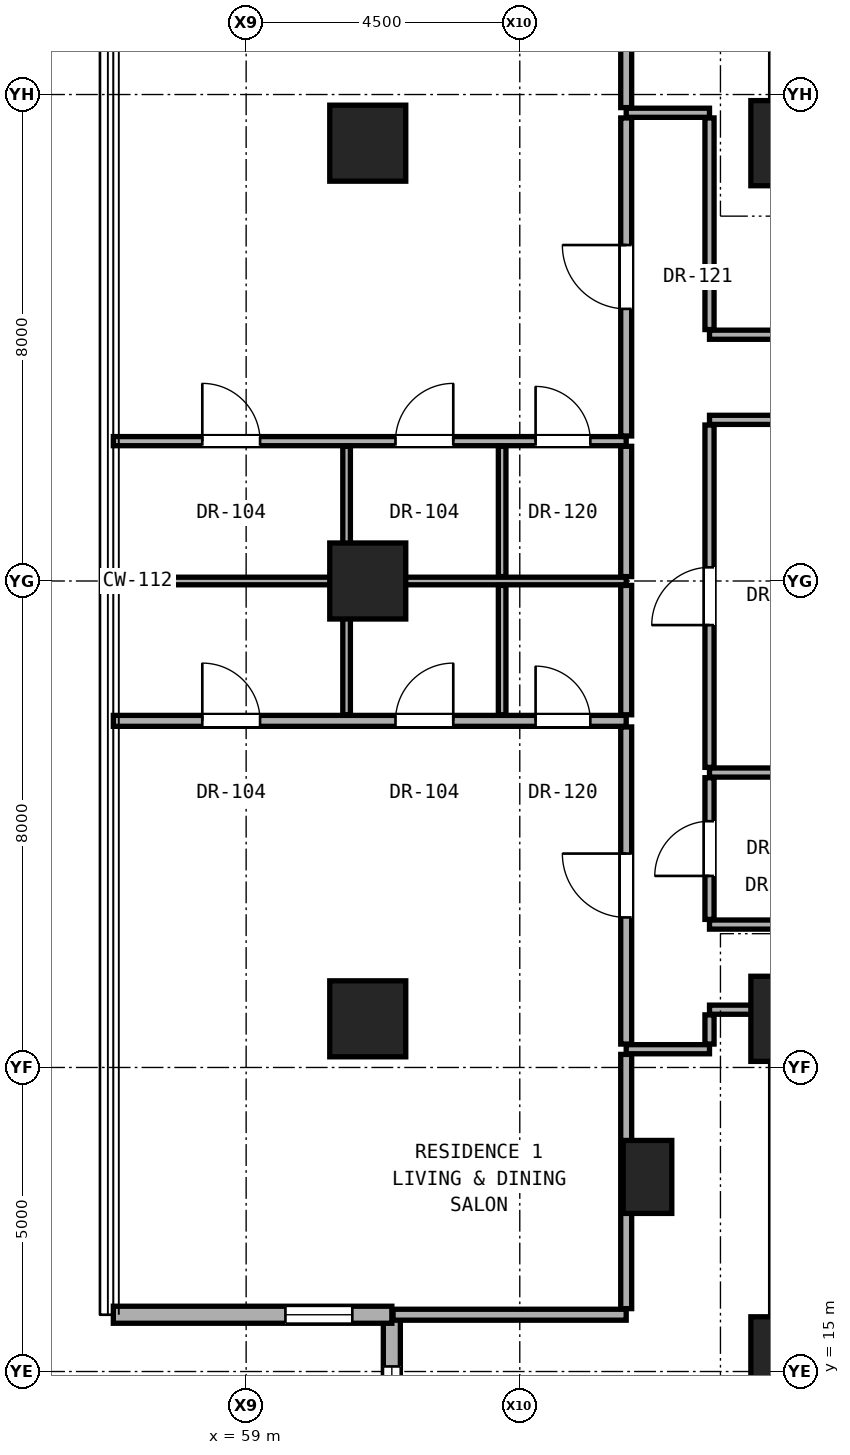
"""IFC4 building model, lengths in metres.
Left out: names, types, materials, properties, quantities, classifications, styles, units other than length and angle.
Written with IfcOpenShell. Run it as: python <this file> out.ifc"""

import sys

from ifc_helpers import new_model, si_unit, direction, frame, frame_2d, origin, origin_2d, place, context, subcontext, project, spatial, rectangle, hollow_rectangle, extrude, element, fill, save


model = new_model("IFC4")
c1 = context("Model", 3, precision=1e-05, world=origin(), true_north=direction((0.0, 1.0)))
c2 = subcontext(c1, "Body", "Model", "MODEL_VIEW")
j1 = project(units=[si_unit("LENGTHUNIT", "METRE"), si_unit("PLANEANGLEUNIT", "RADIAN")], contexts=[c1])
p1 = place(None, origin())
s1 = spatial("IfcSite", under=j1, at=p1, CompositionType="ELEMENT")
p2 = place(p1, origin())
s2 = spatial("IfcBuilding", under=s1, at=p2, CompositionType="ELEMENT")
p3 = place(p2, frame((0.0, 0.0, 48.8)))
s3 = spatial("IfcBuildingStorey", under=s2, at=p3, CompositionType="ELEMENT", Elevation=48.8)
for number, where, z_axis, x_axis in (
    (1, (68.0, 15.2, 0.0), (0.0, 0.0, 1.0), (1.0, 0.0, 0.0)),
    (2, (68.0, 20.8, 0.0), (0.0, 0.0, 1.0), (1.0, 0.0, 0.0)),
    (3, (68.0, 35.2, 0.0), (0.0, 0.0, 1.0), (1.0, 0.0, 0.0)),
):
    element("IfcColumn", number, at=place(p3, frame(where, z_axis=z_axis, x_axis=x_axis)), inside=s3, PredefinedType="COLUMN", context=c2, shape_type="SweptSolid", body=[
        extrude(rectangle(XDim=1.4, YDim=1.4, at=origin_2d()), origin(), (0.0, 0.0, 1.0), 3.3),
    ])
for number, where, z_axis, x_axis in (
    (4, (61.0, 20.8, 0.0), (0.0, 0.0, 1.0), (1.0, 0.0, 0.0)),
    (5, (61.0, 28.0, 0.0), (0.0, 0.0, 1.0), (1.0, 0.0, 0.0)),
    (6, (61.0, 35.2, 0.0), (0.0, 0.0, 1.0), (1.0, 0.0, 0.0)),
):
    element("IfcColumn", number, at=place(p3, frame(where, z_axis=z_axis, x_axis=x_axis)), inside=s3, PredefinedType="COLUMN", context=c2, shape_type="SweptSolid", body=[
        extrude(hollow_rectangle(XDim=1.25, YDim=1.25, WallThickness=0.07, at=origin_2d()), origin(), (0.0, 0.0, 1.0), 3.3),
    ])
p4 = place(p3, frame((65.6, 18.2, 0.0), z_axis=(0.0, 0.0, 1.0), x_axis=(1.0, 0.0, 0.0)))
e7 = element("IfcColumn", 7, at=p4, inside=s3, PredefinedType="PILASTER", context=c2, shape_type="SweptSolid", body=[
    extrude(rectangle(XDim=0.8, YDim=1.2, at=origin_2d()), origin(), (0.0, 0.0, 1.0), 3.3),
])
p5 = place(p3, frame((61.396, 15.934, 0.0), z_axis=(0.0, 0.0, 1.0), x_axis=(0.0, -1.0, 0.0)))
e8 = element("IfcWall", 8, at=p5, inside=s3, PredefinedType="SOLIDWALL", context=c2, shape_type="SweptSolid", body=[
    extrude(rectangle(XDim=4.58, YDim=0.28, at=frame_2d((2.29, 0.0))), origin(), (0.0, 0.0, 1.0), 3.04),
])
p6 = place(p5, frame((0.85, 0.0, 0.79)))
e9 = element("IfcOpeningElement", 9, at=p6, cuts=e8, PredefinedType="OPENING", context=c2, shape_type="SweptSolid", body=[
    extrude(rectangle(XDim=1.5, YDim=2.1, at=frame_2d((0.75, 1.05))), frame((0.0, 0.15, 0.0), z_axis=(0.0, -1.0, 0.0), x_axis=(1.0, 0.0, 0.0)), (0.0, 0.0, 1.0), 0.3),
])
p7 = place(p3, frame((56.816, 15.934, 0.0), z_axis=(0.0, 0.0, 1.0), x_axis=(1.0, 0.0, 0.0)))
e10 = element("IfcWall", 10, at=p7, inside=s3, PredefinedType="SOLIDWALL", context=c2, shape_type="SweptSolid", body=[
    extrude(rectangle(XDim=4.58, YDim=0.28, at=frame_2d((2.29, 0.0))), origin(), (0.0, 0.0, 1.0), 3.04),
])
p8 = place(p7, frame((2.83, 0.0, 0.85)))
e11 = element("IfcOpeningElement", 11, at=p8, cuts=e10, PredefinedType="OPENING", context=c2, shape_type="SweptSolid", body=[
    extrude(rectangle(XDim=1.1, YDim=2.0, at=frame_2d((0.55, 1.0))), frame((0.0, 0.15, 0.0), z_axis=(0.0, -1.0, 0.0), x_axis=(1.0, 0.0, 0.0)), (0.0, 0.0, 1.0), 0.3),
])
p9 = place(p3, frame((61.416, 15.934, 0.0), z_axis=(0.0, 0.0, 1.0), x_axis=(1.0, 0.0, 0.0)))
e12 = element("IfcWall", 12, at=p9, inside=s3, PredefinedType="PARTITIONING", context=c2, shape_type="SweptSolid", body=[
    extrude(rectangle(XDim=3.834, YDim=0.18, at=frame_2d((1.917, 0.0))), origin(), (0.0, 0.0, 1.0), 3.06),
])
p10 = place(p3, frame((65.25, 20.3, 0.0), z_axis=(0.0, 0.0, 1.0), x_axis=(1.0, 0.0, 0.0)))
e13 = element("IfcWall", 13, at=p10, inside=s3, PredefinedType="PARTITIONING", context=c2, shape_type="SweptSolid", body=[
    extrude(rectangle(XDim=1.37, YDim=0.15, at=frame_2d((0.685, 0.0))), origin(), (0.0, 0.0, 1.0), 3.06),
])
p11 = place(p3, frame((66.62, 20.95, 0.0), z_axis=(0.0, 0.0, 1.0), x_axis=(1.0, 0.0, 0.0)))
e14 = element("IfcWall", 14, at=p11, inside=s3, PredefinedType="PARTITIONING", context=c2, shape_type="SweptSolid", body=[
    extrude(rectangle(XDim=1.01, YDim=0.15, at=frame_2d((0.505, 0.0))), origin(), (0.0, 0.0, 1.0), 2.452),
])
p12 = place(p3, frame((66.62, 22.35, 0.0), z_axis=(0.0, 0.0, 1.0), x_axis=(1.0, 0.0, 0.0)))
e15 = element("IfcWall", 15, at=p12, inside=s3, PredefinedType="PARTITIONING", context=c2, shape_type="SweptSolid", body=[
    extrude(rectangle(XDim=19.63, YDim=0.15, at=frame_2d((9.815, 0.0))), origin(), (0.0, 0.0, 1.0), 2.125),
])
p13 = place(p12, frame((8.129, 0.0, 0.0)))
e16 = element("IfcOpeningElement", 16, at=p13, cuts=e15, PredefinedType="OPENING", context=c2, shape_type="SweptSolid", body=[
    extrude(rectangle(XDim=0.85, YDim=2.01, at=frame_2d((0.425, 1.005))), frame((0.0, 0.085, 0.0), z_axis=(0.0, -1.0, 0.0), x_axis=(1.0, 0.0, 0.0)), (0.0, 0.0, 1.0), 0.17),
])
p14 = place(p3, frame((66.62, 24.85, 0.0), z_axis=(0.0, 0.0, 1.0), x_axis=(1.0, 0.0, 0.0)))
e17 = element("IfcWall", 17, at=p14, inside=s3, PredefinedType="PARTITIONING", context=c2, shape_type="SweptSolid", body=[
    extrude(rectangle(XDim=3.13, YDim=0.15, at=frame_2d((1.565, 0.0))), origin(), (0.0, 0.0, 1.0), 2.125),
])
p15 = place(p3, frame((56.816, 25.7, 0.0), z_axis=(0.0, 0.0, 1.0), x_axis=(1.0, 0.0, 0.0)))
e18 = element("IfcWall", 18, at=p15, inside=s3, PredefinedType="PARTITIONING", context=c2, shape_type="SweptSolid", body=[
    extrude(rectangle(XDim=8.434, YDim=0.18, at=frame_2d((4.217, 0.0))), origin(), (0.0, 0.0, 1.0), 2.196),
])
p16 = place(p15, frame((1.463, 0.0, 0.0)))
e19 = element("IfcOpeningElement", 19, at=p16, cuts=e18, PredefinedType="OPENING", context=c2, shape_type="SweptSolid", body=[
    extrude(rectangle(XDim=0.95, YDim=2.15, at=frame_2d((0.475, 1.075))), frame((0.0, 0.1, 0.0), z_axis=(0.0, -1.0, 0.0), x_axis=(1.0, 0.0, 0.0)), (0.0, 0.0, 1.0), 0.2),
])
p17 = place(p15, frame((4.64, 0.0, 0.0)))
e20 = element("IfcOpeningElement", 20, at=p17, cuts=e18, PredefinedType="OPENING", context=c2, shape_type="SweptSolid", body=[
    extrude(rectangle(XDim=0.95, YDim=2.15, at=frame_2d((0.475, 1.075))), frame((0.0, 0.1, 0.0), z_axis=(0.0, -1.0, 0.0), x_axis=(1.0, 0.0, 0.0)), (0.0, 0.0, 1.0), 0.2),
])
p18 = place(p15, frame((6.944, 0.0, 0.0)))
e21 = element("IfcOpeningElement", 21, at=p18, cuts=e18, PredefinedType="OPENING", context=c2, shape_type="SweptSolid", body=[
    extrude(rectangle(XDim=0.9, YDim=2.1, at=frame_2d((0.45, 1.05))), frame((0.0, 0.1, 0.0), z_axis=(0.0, -1.0, 0.0), x_axis=(1.0, 0.0, 0.0)), (0.0, 0.0, 1.0), 0.2),
])
p19 = place(p3, frame((56.816, 28.0, 0.0), z_axis=(0.0, 0.0, 1.0), x_axis=(1.0, 0.0, 0.0)))
e22 = element("IfcWall", 22, at=p19, inside=s3, PredefinedType="PARTITIONING", context=c2, shape_type="SweptSolid", body=[
    extrude(rectangle(XDim=8.434, YDim=0.125, at=frame_2d((4.217, 0.0))), origin(), (0.0, 0.0, 1.0), 2.196),
])
p20 = place(p3, frame((56.816, 30.3, 0.0), z_axis=(0.0, 0.0, 1.0), x_axis=(1.0, 0.0, 0.0)))
e23 = element("IfcWall", 23, at=p20, inside=s3, PredefinedType="PARTITIONING", context=c2, shape_type="SweptSolid", body=[
    extrude(rectangle(XDim=8.434, YDim=0.15, at=frame_2d((4.217, 0.0))), origin(), (0.0, 0.0, 1.0), 2.196),
])
p21 = place(p20, frame((1.463, 0.0, 0.0)))
e24 = element("IfcOpeningElement", 24, at=p21, cuts=e23, PredefinedType="OPENING", context=c2, shape_type="SweptSolid", body=[
    extrude(rectangle(XDim=0.95, YDim=2.15, at=frame_2d((0.475, 1.075))), frame((0.0, 0.085, 0.0), z_axis=(0.0, -1.0, 0.0), x_axis=(1.0, 0.0, 0.0)), (0.0, 0.0, 1.0), 0.17),
])
p22 = place(p20, frame((4.64, 0.0, 0.0)))
e25 = element("IfcOpeningElement", 25, at=p22, cuts=e23, PredefinedType="OPENING", context=c2, shape_type="SweptSolid", body=[
    extrude(rectangle(XDim=0.95, YDim=2.15, at=frame_2d((0.475, 1.075))), frame((0.0, 0.085, 0.0), z_axis=(0.0, -1.0, 0.0), x_axis=(1.0, 0.0, 0.0)), (0.0, 0.0, 1.0), 0.17),
])
p23 = place(p20, frame((6.944, 0.0, 0.0)))
e26 = element("IfcOpeningElement", 26, at=p23, cuts=e23, PredefinedType="OPENING", context=c2, shape_type="SweptSolid", body=[
    extrude(rectangle(XDim=0.9, YDim=2.1, at=frame_2d((0.45, 1.05))), frame((0.0, 0.085, 0.0), z_axis=(0.0, -1.0, 0.0), x_axis=(1.0, 0.0, 0.0)), (0.0, 0.0, 1.0), 0.17),
])
p24 = place(p3, frame((66.62, 30.65, 0.0), z_axis=(0.0, 0.0, 1.0), x_axis=(1.0, 0.0, 0.0)))
e27 = element("IfcWall", 27, at=p24, inside=s3, PredefinedType="PARTITIONING", context=c2, shape_type="SweptSolid", body=[
    extrude(rectangle(XDim=19.63, YDim=0.15, at=frame_2d((9.815, 0.0))), origin(), (0.0, 0.0, 1.0), 2.125),
])
p25 = place(p24, frame((3.855, 0.0, 0.0)))
e28 = element("IfcOpeningElement", 28, at=p25, cuts=e27, PredefinedType="OPENING", context=c2, shape_type="SweptSolid", body=[
    extrude(rectangle(XDim=0.85, YDim=2.01, at=frame_2d((0.425, 1.005))), frame((0.0, 0.085, 0.0), z_axis=(0.0, -1.0, 0.0), x_axis=(1.0, 0.0, 0.0)), (0.0, 0.0, 1.0), 0.17),
])
p26 = place(p24, frame((15.209, 0.0, 0.0)))
e29 = element("IfcOpeningElement", 29, at=p26, cuts=e27, PredefinedType="OPENING", context=c2, shape_type="SweptSolid", body=[
    extrude(rectangle(XDim=0.85, YDim=2.01, at=frame_2d((0.425, 1.005))), frame((0.0, 0.085, 0.0), z_axis=(0.0, -1.0, 0.0), x_axis=(1.0, 0.0, 0.0)), (0.0, 0.0, 1.0), 0.17),
])
p27 = place(p3, frame((66.62, 32.05, 0.0), z_axis=(0.0, 0.0, 1.0), x_axis=(1.0, 0.0, 0.0)))
e30 = element("IfcWall", 30, at=p27, inside=s3, PredefinedType="PARTITIONING", context=c2, shape_type="SweptSolid", body=[
    extrude(rectangle(XDim=2.18, YDim=0.15, at=frame_2d((1.09, 0.0))), origin(), (0.0, 0.0, 1.0), 2.125),
])
p28 = place(p3, frame((65.25, 35.7, 0.0), z_axis=(0.0, 0.0, 1.0), x_axis=(1.0, 0.0, 0.0)))
e31 = element("IfcWall", 31, at=p28, inside=s3, PredefinedType="PARTITIONING", context=c2, shape_type="SweptSolid", body=[
    extrude(rectangle(XDim=1.37, YDim=0.15, at=frame_2d((0.685, 0.0))), origin(), (0.0, 0.0, 1.0), 3.06),
])
p29 = place(p3, frame((60.652, 25.8, 0.0), z_axis=(0.0, 0.0, 1.0), x_axis=(0.0, 1.0, 0.0)))
e32 = element("IfcWall", 32, at=p29, inside=s3, PredefinedType="PARTITIONING", context=c2, shape_type="SweptSolid", body=[
    extrude(rectangle(XDim=2.127, YDim=0.125, at=frame_2d((1.064, 0.0))), origin(), (0.0, 0.0, 1.0), 3.06),
])
p30 = place(p3, frame((60.652, 28.073, 0.0), z_axis=(0.0, 0.0, 1.0), x_axis=(0.0, 1.0, 0.0)))
e33 = element("IfcWall", 33, at=p30, inside=s3, PredefinedType="PARTITIONING", context=c2, shape_type="SweptSolid", body=[
    extrude(rectangle(XDim=2.143, YDim=0.125, at=frame_2d((1.071, 0.0))), origin(), (0.0, 0.0, 1.0), 3.06),
])
p31 = place(p3, frame((63.21, 25.8, 0.0), z_axis=(0.0, 0.0, 1.0), x_axis=(0.0, 1.0, 0.0)))
e34 = element("IfcWall", 34, at=p31, inside=s3, PredefinedType="PARTITIONING", context=c2, shape_type="SweptSolid", body=[
    extrude(rectangle(XDim=2.127, YDim=0.125, at=frame_2d((1.064, 0.0))), origin(), (0.0, 0.0, 1.0), 2.279),
])
p32 = place(p3, frame((63.21, 28.073, 0.0), z_axis=(0.0, 0.0, 1.0), x_axis=(0.0, 1.0, 0.0)))
e35 = element("IfcWall", 35, at=p32, inside=s3, PredefinedType="PARTITIONING", context=c2, shape_type="SweptSolid", body=[
    extrude(rectangle(XDim=2.143, YDim=0.125, at=frame_2d((1.071, 0.0))), origin(), (0.0, 0.0, 1.0), 2.279),
])
p33 = place(p3, frame((65.25, 16.034, 0.0), z_axis=(0.0, 0.0, 1.0), x_axis=(0.0, 1.0, 0.0)))
e36 = element("IfcWall", 36, at=p33, inside=s3, PredefinedType="PARTITIONING", context=c2, shape_type="SweptSolid", body=[
    extrude(rectangle(XDim=4.181, YDim=0.18, at=frame_2d((2.091, 0.0))), origin(), (0.0, 0.0, 1.0), 2.436),
])
p34 = place(p3, frame((65.25, 20.385, 0.0), z_axis=(0.0, 0.0, 1.0), x_axis=(0.0, 1.0, 0.0)))
e37 = element("IfcWall", 37, at=p34, inside=s3, PredefinedType="PARTITIONING", context=c2, shape_type="SweptSolid", body=[
    extrude(rectangle(XDim=5.215, YDim=0.18, at=frame_2d((2.607, 0.0))), origin(), (0.0, 0.0, 1.0), 2.452),
])
p35 = place(p34, frame((2.083, 0.0, 0.0)))
e38 = element("IfcOpeningElement", 38, at=p35, cuts=e37, PredefinedType="OPENING", context=c2, shape_type="SweptSolid", body=[
    extrude(rectangle(XDim=1.05, YDim=2.2, at=frame_2d((0.525, 1.1))), frame((0.0, 0.1, 0.0), z_axis=(0.0, -1.0, 0.0), x_axis=(1.0, 0.0, 0.0)), (0.0, 0.0, 1.0), 0.2),
])
p36 = place(p3, frame((65.25, 25.8, 0.0), z_axis=(0.0, 0.0, 1.0), x_axis=(0.0, 1.0, 0.0)))
e39 = element("IfcWall", 39, at=p36, inside=s3, PredefinedType="PARTITIONING", context=c2, shape_type="SweptSolid", body=[
    extrude(rectangle(XDim=2.127, YDim=0.18, at=frame_2d((1.064, 0.0))), origin(), (0.0, 0.0, 1.0), 2.279),
])
p37 = place(p3, frame((65.25, 28.073, 0.0), z_axis=(0.0, 0.0, 1.0), x_axis=(0.0, 1.0, 0.0)))
e40 = element("IfcWall", 40, at=p37, inside=s3, PredefinedType="PARTITIONING", context=c2, shape_type="SweptSolid", body=[
    extrude(rectangle(XDim=2.143, YDim=0.18, at=frame_2d((1.071, 0.0))), origin(), (0.0, 0.0, 1.0), 2.279),
])
p38 = place(p3, frame((65.25, 30.385, 0.0), z_axis=(0.0, 0.0, 1.0), x_axis=(0.0, 1.0, 0.0)))
e41 = element("IfcWall", 41, at=p38, inside=s3, PredefinedType="PARTITIONING", context=c2, shape_type="SweptSolid", body=[
    extrude(rectangle(XDim=5.23, YDim=0.18, at=frame_2d((2.615, 0.0))), origin(), (0.0, 0.0, 1.0), 2.452),
])
p39 = place(p38, frame((2.09, 0.0, 0.0)))
e42 = element("IfcOpeningElement", 42, at=p39, cuts=e41, PredefinedType="OPENING", context=c2, shape_type="SweptSolid", body=[
    extrude(rectangle(XDim=1.05, YDim=2.2, at=frame_2d((0.525, 1.1))), frame((0.0, 0.1, 0.0), z_axis=(0.0, -1.0, 0.0), x_axis=(1.0, 0.0, 0.0)), (0.0, 0.0, 1.0), 0.2),
])
p40 = place(p3, frame((65.25, 35.785, 0.0), z_axis=(0.0, 0.0, 1.0), x_axis=(0.0, 1.0, 0.0)))
e43 = element("IfcWall", 43, at=p40, inside=s3, PredefinedType="PARTITIONING", context=c2, shape_type="SweptSolid", body=[
    extrude(rectangle(XDim=4.196, YDim=0.18, at=frame_2d((2.098, 0.0))), origin(), (0.0, 0.0, 1.0), 2.436),
])
p41 = place(p3, frame((66.62, 20.385, 0.0), z_axis=(0.0, 0.0, 1.0), x_axis=(0.0, 1.0, 0.0)))
e44 = element("IfcWall", 44, at=p41, inside=s3, PredefinedType="PARTITIONING", context=c2, shape_type="SweptSolid", body=[
    extrude(rectangle(XDim=0.48, YDim=0.15, at=frame_2d((0.24, 0.0))), origin(), (0.0, 0.0, 1.0), 2.452),
])
p42 = place(p3, frame((66.62, 22.435, 0.0), z_axis=(0.0, 0.0, 1.0), x_axis=(0.0, 1.0, 0.0)))
e45 = element("IfcWall", 45, at=p42, inside=s3, PredefinedType="PARTITIONING", context=c2, shape_type="SweptSolid", body=[
    extrude(rectangle(XDim=2.33, YDim=0.15, at=frame_2d((1.165, 0.0))), origin(), (0.0, 0.0, 1.0), 3.06),
])
p43 = place(p42, frame((0.715, 0.0, 0.0)))
e46 = element("IfcOpeningElement", 46, at=p43, cuts=e45, PredefinedType="OPENING", context=c2, shape_type="SweptSolid", body=[
    extrude(rectangle(XDim=0.9, YDim=2.1, at=frame_2d((0.45, 1.05))), frame((0.0, 0.085, 0.0), z_axis=(0.0, -1.0, 0.0), x_axis=(1.0, 0.0, 0.0)), (0.0, 0.0, 1.0), 0.17),
])
p44 = place(p3, frame((66.62, 24.935, 0.0), z_axis=(0.0, 0.0, 1.0), x_axis=(0.0, 1.0, 0.0)))
e47 = element("IfcWall", 47, at=p44, inside=s3, PredefinedType="PARTITIONING", context=c2, shape_type="SweptSolid", body=[
    extrude(rectangle(XDim=5.63, YDim=0.15, at=frame_2d((2.815, 0.0))), origin(), (0.0, 0.0, 1.0), 2.279),
])
p45 = place(p44, frame((2.34, 0.0, 0.0)))
e48 = element("IfcOpeningElement", 48, at=p45, cuts=e47, PredefinedType="OPENING", context=c2, shape_type="SweptSolid", body=[
    extrude(rectangle(XDim=0.95, YDim=2.15, at=frame_2d((0.475, 1.075))), frame((0.0, 0.085, 0.0), z_axis=(0.0, -1.0, 0.0), x_axis=(1.0, 0.0, 0.0)), (0.0, 0.0, 1.0), 0.17),
])
p46 = place(p3, frame((66.62, 32.135, 0.0), z_axis=(0.0, 0.0, 1.0), x_axis=(0.0, 1.0, 0.0)))
e49 = element("IfcWall", 49, at=p46, inside=s3, PredefinedType="PARTITIONING", context=c2, shape_type="SweptSolid", body=[
    extrude(rectangle(XDim=3.48, YDim=0.15, at=frame_2d((1.74, 0.0))), origin(), (0.0, 0.0, 1.0), 2.452),
])
p47 = place(p6, origin())
e50 = element("IfcWindow", 50, at=p47, inside=s3, PartitioningType="SINGLE_PANEL", PredefinedType="WINDOW", context=c2, shape_type="SweptSolid", body=[
    extrude(rectangle(XDim=1.5, YDim=2.1, at=frame_2d((0.75, 1.05))), frame((0.0, 0.03, 0.0), z_axis=(0.0, -1.0, 0.0), x_axis=(1.0, 0.0, 0.0)), (0.0, 0.0, 1.0), 0.06),
])
fill(e9, e50)
p48 = place(p8, origin())
e51 = element("IfcWindow", 51, at=p48, inside=s3, PartitioningType="SINGLE_PANEL", PredefinedType="WINDOW", context=c2, shape_type="SweptSolid", body=[
    extrude(rectangle(XDim=1.1, YDim=2.0, at=frame_2d((0.55, 1.0))), frame((0.0, 0.03, 0.0), z_axis=(0.0, -1.0, 0.0), x_axis=(1.0, 0.0, 0.0)), (0.0, 0.0, 1.0), 0.06),
])
fill(e11, e51)
p49 = place(p43, origin())
e52 = element("IfcDoor", 52, at=p49, inside=s3, OperationType="SINGLE_SWING_LEFT", PredefinedType="DOOR", context=c2, shape_type="SweptSolid", body=[
    extrude(rectangle(XDim=0.9, YDim=2.1, at=frame_2d((0.45, 1.05))), frame((0.0, 0.025, 0.0), z_axis=(0.0, -1.0, 0.0), x_axis=(1.0, 0.0, 0.0)), (0.0, 0.0, 1.0), 0.05),
])
fill(e46, e52)
p50 = place(p35, origin())
e53 = element("IfcDoor", 53, at=p50, inside=s3, OperationType="SINGLE_SWING_RIGHT", PredefinedType="DOOR", context=c2, shape_type="SweptSolid", body=[
    extrude(rectangle(XDim=1.05, YDim=2.2, at=frame_2d((0.525, 1.1))), frame((0.0, 0.025, 0.0), z_axis=(0.0, -1.0, 0.0), x_axis=(1.0, 0.0, 0.0)), (0.0, 0.0, 1.0), 0.05),
])
fill(e38, e53)
p51 = place(p16, origin())
e54 = element("IfcDoor", 54, at=p51, inside=s3, OperationType="SINGLE_SWING_LEFT", PredefinedType="DOOR", context=c2, shape_type="SweptSolid", body=[
    extrude(rectangle(XDim=0.95, YDim=2.15, at=frame_2d((0.475, 1.075))), frame((0.0, 0.025, 0.0), z_axis=(0.0, -1.0, 0.0), x_axis=(1.0, 0.0, 0.0)), (0.0, 0.0, 1.0), 0.05),
])
fill(e19, e54)
p52 = place(p17, origin())
e55 = element("IfcDoor", 55, at=p52, inside=s3, OperationType="SINGLE_SWING_RIGHT", PredefinedType="DOOR", context=c2, shape_type="SweptSolid", body=[
    extrude(rectangle(XDim=0.95, YDim=2.15, at=frame_2d((0.475, 1.075))), frame((0.0, 0.025, 0.0), z_axis=(0.0, -1.0, 0.0), x_axis=(1.0, 0.0, 0.0)), (0.0, 0.0, 1.0), 0.05),
])
fill(e20, e55)
p53 = place(p18, origin())
e56 = element("IfcDoor", 56, at=p53, inside=s3, OperationType="SINGLE_SWING_LEFT", PredefinedType="DOOR", context=c2, shape_type="SweptSolid", body=[
    extrude(rectangle(XDim=0.9, YDim=2.1, at=frame_2d((0.45, 1.05))), frame((0.0, 0.025, 0.0), z_axis=(0.0, -1.0, 0.0), x_axis=(1.0, 0.0, 0.0)), (0.0, 0.0, 1.0), 0.05),
])
fill(e21, e56)
p54 = place(p39, origin())
e57 = element("IfcDoor", 57, at=p54, inside=s3, OperationType="SINGLE_SWING_RIGHT", PredefinedType="DOOR", context=c2, shape_type="SweptSolid", body=[
    extrude(rectangle(XDim=1.05, YDim=2.2, at=frame_2d((0.525, 1.1))), frame((0.0, 0.025, 0.0), z_axis=(0.0, -1.0, 0.0), x_axis=(1.0, 0.0, 0.0)), (0.0, 0.0, 1.0), 0.05),
])
fill(e42, e57)
p55 = place(p21, origin())
e58 = element("IfcDoor", 58, at=p55, inside=s3, OperationType="SINGLE_SWING_LEFT", PredefinedType="DOOR", context=c2, shape_type="SweptSolid", body=[
    extrude(rectangle(XDim=0.95, YDim=2.15, at=frame_2d((0.475, 1.075))), frame((0.0, 0.025, 0.0), z_axis=(0.0, -1.0, 0.0), x_axis=(1.0, 0.0, 0.0)), (0.0, 0.0, 1.0), 0.05),
])
fill(e24, e58)
p56 = place(p22, origin())
e59 = element("IfcDoor", 59, at=p56, inside=s3, OperationType="SINGLE_SWING_RIGHT", PredefinedType="DOOR", context=c2, shape_type="SweptSolid", body=[
    extrude(rectangle(XDim=0.95, YDim=2.15, at=frame_2d((0.475, 1.075))), frame((0.0, 0.025, 0.0), z_axis=(0.0, -1.0, 0.0), x_axis=(1.0, 0.0, 0.0)), (0.0, 0.0, 1.0), 0.05),
])
fill(e25, e59)
p57 = place(p23, origin())
e60 = element("IfcDoor", 60, at=p57, inside=s3, OperationType="SINGLE_SWING_LEFT", PredefinedType="DOOR", context=c2, shape_type="SweptSolid", body=[
    extrude(rectangle(XDim=0.9, YDim=2.1, at=frame_2d((0.45, 1.05))), frame((0.0, 0.025, 0.0), z_axis=(0.0, -1.0, 0.0), x_axis=(1.0, 0.0, 0.0)), (0.0, 0.0, 1.0), 0.05),
])
fill(e26, e60)
p58 = place(p45, origin())
e61 = element("IfcDoor", 61, at=p58, inside=s3, OperationType="SINGLE_SWING_LEFT", PredefinedType="DOOR", context=c2, shape_type="SweptSolid", body=[
    extrude(rectangle(XDim=0.95, YDim=2.15, at=frame_2d((0.475, 1.075))), frame((0.0, 0.025, 0.0), z_axis=(0.0, -1.0, 0.0), x_axis=(1.0, 0.0, 0.0)), (0.0, 0.0, 1.0), 0.05),
])
fill(e48, e61)
save(model, sys.argv[1])
